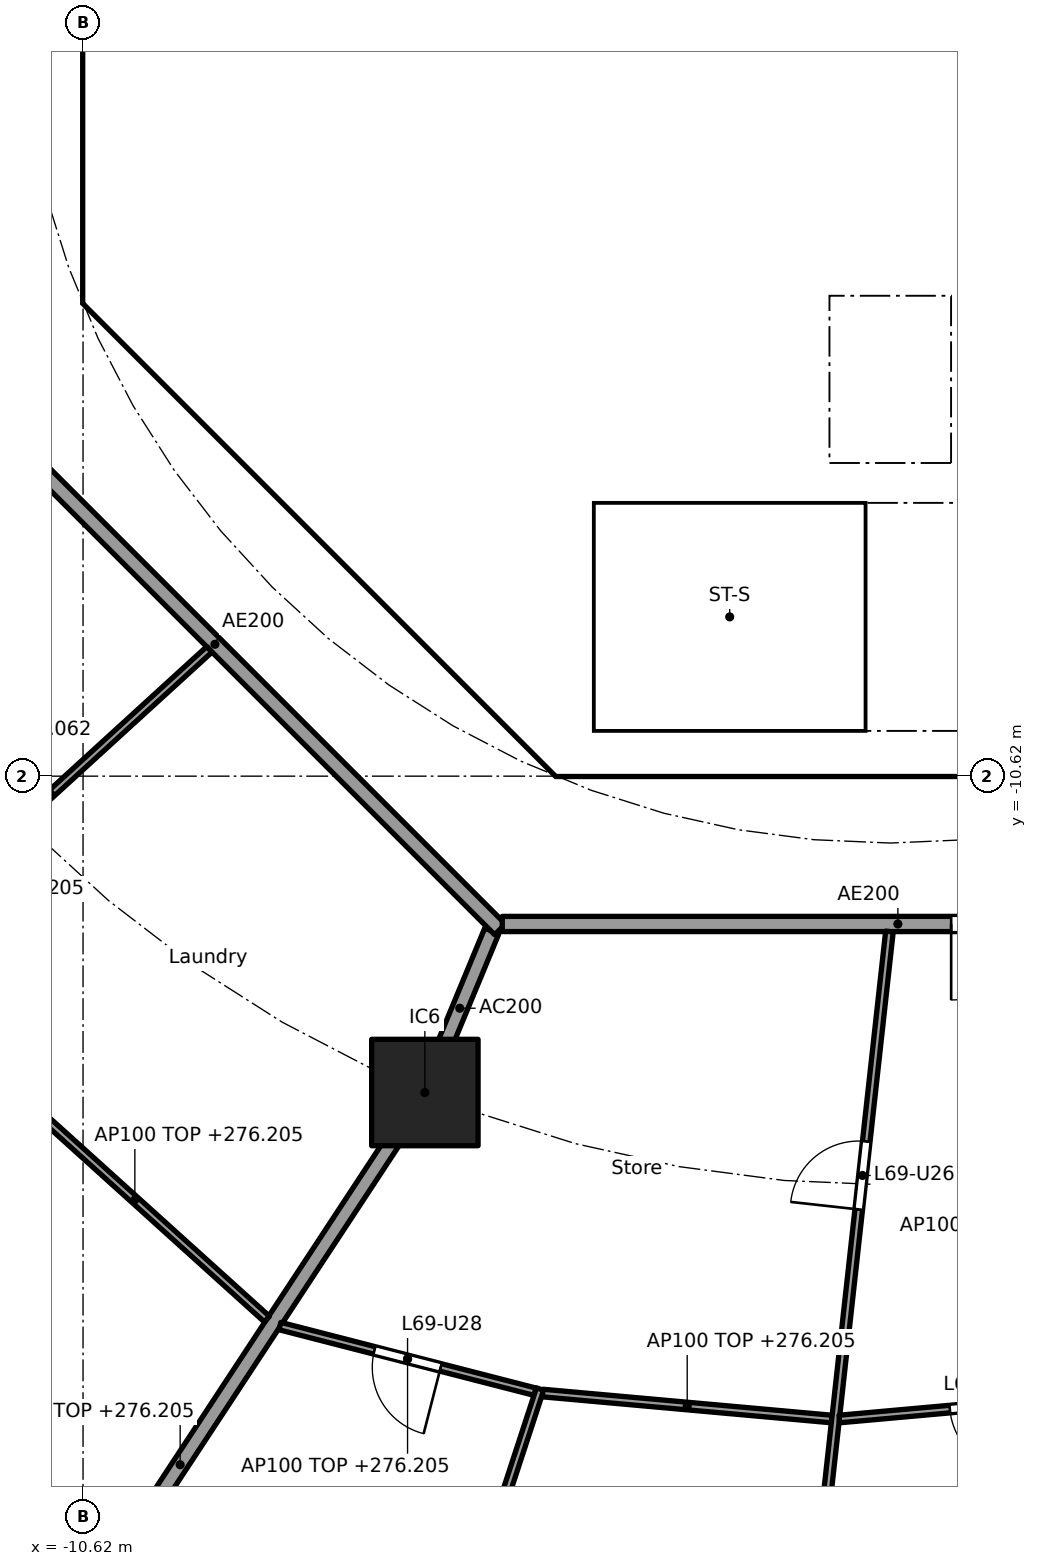
"""IFC4 building model, lengths in metres.
Left out: names, types, materials, properties, quantities, classifications, styles, units other than length and angle.
Written with IfcOpenShell. Run it as: python <this file> out.ifc"""

import sys

from ifc_helpers import new_model, si_unit, direction, frame, frame_2d, origin, origin_2d, place, context, subcontext, project, spatial, polyline, rectangle, outline, extrude, element, fill, save


model = new_model("IFC4")
c1 = context("Model", 3, precision=1e-05, world=origin(), true_north=direction((0.0, 1.0)))
c2 = subcontext(c1, "Body", "Model", "MODEL_VIEW")
j1 = project(units=[si_unit("LENGTHUNIT", "METRE"), si_unit("PLANEANGLEUNIT", "RADIAN")], contexts=[c1])
p1 = place(None, origin())
s1 = spatial("IfcSite", under=j1, at=p1, CompositionType="ELEMENT")
p2 = place(p1, origin())
s2 = spatial("IfcBuilding", under=s1, at=p2, CompositionType="ELEMENT")
p3 = place(p2, frame((0.0, 0.0, 273.3)))
s3 = spatial("IfcBuildingStorey", under=s2, at=p3, CompositionType="ELEMENT", Elevation=273.3)
p4 = place(p3, frame((-6.123, -14.782, 0.0), z_axis=(0.0, 0.0, 1.0), x_axis=(1.0, 0.0, 0.0)))
e1 = element("IfcColumn", 1, at=p4, inside=s3, PredefinedType="COLUMN", context=c2, shape_type="SweptSolid", body=[
    extrude(rectangle(XDim=1.4, YDim=1.4, at=origin_2d()), origin(), (0.0, 0.0, 1.0), 3.7),
])
p5 = place(p3, frame((-10.325, 3.801, 0.0), z_axis=(0.0, 0.0, 1.0), x_axis=(0.0, -1.0, 0.0)))
e2 = element("IfcWall", 2, at=p5, inside=s3, PredefinedType="SHEAR", context=c2, shape_type="SweptSolid", body=[
    extrude(rectangle(XDim=7.602, YDim=0.6, at=frame_2d((3.801, 0.0))), origin(), (0.0, 0.0, 1.0), 3.44),
])
p6 = place(p5, frame((0.651, 0.0, 0.0)))
e3 = element("IfcOpeningElement", 3, at=p6, cuts=e2, PredefinedType="OPENING", context=c2, shape_type="SweptSolid", body=[
    extrude(rectangle(XDim=1.5, YDim=2.1, at=frame_2d((0.75, 1.05))), frame((0.0, 0.31, 0.0), z_axis=(0.0, -1.0, 0.0), x_axis=(1.0, 0.0, 0.0)), (0.0, 0.0, 1.0), 0.62),
])
p7 = place(p5, frame((5.451, 0.0, 0.0)))
e4 = element("IfcOpeningElement", 4, at=p7, cuts=e2, PredefinedType="OPENING", context=c2, shape_type="SweptSolid", body=[
    extrude(rectangle(XDim=1.5, YDim=2.1, at=frame_2d((0.75, 1.05))), frame((0.0, 0.31, 0.0), z_axis=(0.0, -1.0, 0.0), x_axis=(1.0, 0.0, 0.0)), (0.0, 0.0, 1.0), 0.62),
])
p8 = place(p3, frame((-9.988, -4.613, 0.0), z_axis=(0.0, 0.0, 1.0), x_axis=(0.707106781187, -0.707106781187, 0.0)))
e5 = element("IfcWall", 5, at=p8, inside=s3, PredefinedType="SHEAR", context=c2, shape_type="SweptSolid", body=[
    extrude(rectangle(XDim=7.602, YDim=0.6, at=frame_2d((3.801, 0.0))), origin(), (0.0, 0.0, 1.0), 3.44),
])
p9 = place(p8, frame((6.151, 0.0, 0.0)))
e6 = element("IfcOpeningElement", 6, at=p9, cuts=e5, PredefinedType="OPENING", context=c2, shape_type="SweptSolid", body=[
    extrude(rectangle(XDim=1.1, YDim=2.1, at=frame_2d((0.55, 1.05))), frame((0.0, 0.31, 0.0), z_axis=(0.0, -1.0, 0.0), x_axis=(1.0, 0.0, 0.0)), (0.0, 0.0, 1.0), 0.62),
])
p10 = place(p3, frame((-5.8, -8.227, 0.0), z_axis=(0.0, 0.0, 1.0), x_axis=(0.0, 1.0, 0.0)))
e7 = element("IfcWall", 7, at=p10, inside=s3, PredefinedType="PARTITIONING", context=c2, shape_type="SweptSolid", body=[
    extrude(rectangle(XDim=3.927, YDim=0.15, at=frame_2d((1.963, 0.0))), origin(), (0.0, 0.0, 1.0), 3.44),
])
p11 = place(p10, frame((2.615, 0.0, 0.0)))
e8 = element("IfcOpeningElement", 8, at=p11, cuts=e7, PredefinedType="OPENING", context=c2, shape_type="SweptSolid", body=[
    extrude(rectangle(XDim=0.9, YDim=2.1, at=frame_2d((0.45, 1.05))), frame((0.0, 0.085, 0.0), z_axis=(0.0, -1.0, 0.0), x_axis=(1.0, 0.0, 0.0)), (0.0, 0.0, 1.0), 0.17),
])
p12 = place(p10, frame((0.539, 0.0, 0.0)))
e9 = element("IfcOpeningElement", 9, at=p12, cuts=e7, PredefinedType="OPENING", context=c2, shape_type="SweptSolid", body=[
    extrude(rectangle(XDim=0.9, YDim=2.1, at=frame_2d((0.45, 1.05))), frame((0.0, 0.085, 0.0), z_axis=(0.0, -1.0, 0.0), x_axis=(1.0, 0.0, 0.0)), (0.0, 0.0, 1.0), 0.17),
])
p13 = place(p3, frame((-4.0, -6.5, 0.0), z_axis=(0.0, 0.0, 1.0), x_axis=(0.0, 1.0, 0.0)))
e10 = element("IfcWall", 10, at=p13, inside=s3, PredefinedType="SOLIDWALL", context=c2, shape_type="SweptSolid", body=[
    extrude(rectangle(XDim=2.2, YDim=0.2, at=frame_2d((1.1, 0.0))), origin(), (0.0, 0.0, 1.0), 3.44),
])
p14 = place(p13, frame((0.65, 0.0, 0.0)))
e11 = element("IfcOpeningElement", 11, at=p14, cuts=e10, PredefinedType="OPENING", context=c2, shape_type="SweptSolid", body=[
    extrude(rectangle(XDim=0.9, YDim=2.1, at=frame_2d((0.45, 1.05))), frame((0.0, 0.11, 0.0), z_axis=(0.0, -1.0, 0.0), x_axis=(1.0, 0.0, 0.0)), (0.0, 0.0, 1.0), 0.22),
])
p15 = place(p3, frame((-6.7, -2.0, 0.0), z_axis=(0.0, 0.0, 1.0), x_axis=(1.0, 0.0, 0.0)))
e12 = element("IfcWall", 12, at=p15, inside=s3, PredefinedType="SOLIDWALL", context=c2, shape_type="SweptSolid", body=[
    extrude(rectangle(XDim=13.4, YDim=0.2, at=frame_2d((6.7, 0.0))), origin(), (0.0, 0.0, 1.0), 3.44),
])
p16 = place(p15, frame((9.45, 0.0, 0.0)))
e13 = element("IfcOpeningElement", 13, at=p16, cuts=e12, PredefinedType="OPENING", context=c2, shape_type="SweptSolid", body=[
    extrude(rectangle(XDim=1.1, YDim=2.1, at=frame_2d((0.55, 1.05))), frame((0.0, 0.11, 0.0), z_axis=(0.0, -1.0, 0.0), x_axis=(1.0, 0.0, 0.0)), (0.0, 0.0, 1.0), 0.22),
])
p17 = place(p15, frame((11.65, 0.0, 0.0)))
e14 = element("IfcOpeningElement", 14, at=p17, cuts=e12, PredefinedType="OPENING", context=c2, shape_type="SweptSolid", body=[
    extrude(rectangle(XDim=1.1, YDim=2.1, at=frame_2d((0.55, 1.05))), frame((0.0, 0.11, 0.0), z_axis=(0.0, -1.0, 0.0), x_axis=(1.0, 0.0, 0.0)), (0.0, 0.0, 1.0), 0.22),
])
p18 = place(p15, frame((1.85, 0.0, 0.0)))
e15 = element("IfcOpeningElement", 15, at=p18, cuts=e12, PredefinedType="OPENING", context=c2, shape_type="SweptSolid", body=[
    extrude(rectangle(XDim=0.9, YDim=2.1, at=frame_2d((0.45, 1.05))), frame((0.0, 0.11, 0.0), z_axis=(0.0, -1.0, 0.0), x_axis=(1.0, 0.0, 0.0)), (0.0, 0.0, 1.0), 0.22),
])
p19 = place(p15, frame((6.25, 0.0, 0.0)))
e16 = element("IfcOpeningElement", 16, at=p19, cuts=e12, PredefinedType="OPENING", context=c2, shape_type="SweptSolid", body=[
    extrude(rectangle(XDim=0.9, YDim=2.1, at=frame_2d((0.45, 1.05))), frame((0.0, 0.11, 0.0), z_axis=(0.0, -1.0, 0.0), x_axis=(1.0, 0.0, 0.0)), (0.0, 0.0, 1.0), 0.22),
])
p20 = place(p3, origin())
e17 = element("IfcWall", 17, at=p20, inside=s3, PredefinedType="SHEAR", context=c2, shape_type="SweptSolid", body=[
    extrude(outline(polyline([(-10.625, -3.801), (-10.025, -3.801), (-10.025, -4.152), (-9.776, -4.401), (-10.2, -4.825), (-10.625, -4.401), (-10.625, -3.801)])), origin(), (0.0, 0.0, 1.0), 3.44),
])
p21 = place(p3, origin())
e18 = element("IfcWall", 18, at=p21, inside=s3, PredefinedType="SHEAR", context=c2, shape_type="SweptSolid", body=[
    extrude(outline(polyline([(-4.152, -10.025), (4.152, -10.025), (4.401, -9.776), (4.825, -10.2), (4.401, -10.625), (-4.401, -10.625), (-4.825, -10.2), (-4.401, -9.776), (-4.152, -10.025)])), origin(), (0.0, 0.0, 1.0), 3.44),
])
p22 = place(p3, frame((-10.025, -4.0, 0.0), z_axis=(0.0, 0.0, 1.0), x_axis=(1.0, 0.0, 0.0)))
e19 = element("IfcWall", 19, at=p22, inside=s3, PredefinedType="PARTITIONING", context=c2, shape_type="SweptSolid", body=[
    extrude(rectangle(XDim=3.325, YDim=0.2, at=frame_2d((1.662, 0.0))), origin(), (0.0, 0.0, 1.0), 3.44),
])
p23 = place(p3, frame((-8.001, -6.1, 0.0), z_axis=(0.0, 0.0, 1.0), x_axis=(1.0, 0.0, 0.0)))
e20 = element("IfcWall", 20, at=p23, inside=s3, PredefinedType="PARTITIONING", context=c2, shape_type="SweptSolid", body=[
    extrude(rectangle(XDim=2.126, YDim=0.15, at=frame_2d((1.063, 0.0))), origin(), (0.0, 0.0, 1.0), 3.44),
])
for number, where, z_axis, x_axis in (
    (21, (-0.9, -6.5, 0.0), (0.0, 0.0, 1.0), (0.0, 1.0, 0.0)),
    (22, (0.9, -6.5, 0.0), (0.0, 0.0, 1.0), (0.0, 1.0, 0.0)),
):
    element("IfcWall", number, at=place(p3, frame(where, z_axis=z_axis, x_axis=x_axis)), inside=s3, PredefinedType="SOLIDWALL", context=c2, shape_type="SweptSolid", body=[
        extrude(rectangle(XDim=2.2, YDim=0.2, at=frame_2d((1.1, 0.0))), origin(), (0.0, 0.0, 1.0), 3.44),
    ])
p24 = place(p3, origin())
e23 = element("IfcWall", 23, at=p24, inside=s3, PredefinedType="SOLIDWALL", context=c2, shape_type="SweptSolid", body=[
    extrude(outline(polyline([(-6.7, -2.1), (-6.5, -2.1), (-6.5, -4.1), (-2.3, -4.1), (-2.3, -2.1), (-2.1, -2.1), (-2.1, -4.1), (2.1, -4.1), (2.1, -2.1), (2.3, -2.1), (2.3, -4.1), (4.3, -4.1), (4.3, -2.1), (4.5, -2.1), (4.5, -4.1), (6.5, -4.1), (6.5, -2.1), (6.7, -2.1), (6.7, -4.3), (-6.7, -4.3), (-6.7, -2.1)])), origin(), (0.0, 0.0, 1.0), 3.44),
])
p25 = place(p3, origin())
e24 = element("IfcWall", 24, at=p25, inside=s3, PredefinedType="SOLIDWALL", context=c2, shape_type="SweptSolid", body=[
    extrude(outline(polyline([(-3.9, -10.025), (-4.1, -10.025), (-4.1, -7.025), (-3.9, -7.025), (-3.9, -10.025)])), origin(), (0.0, 0.0, 1.0), 3.44),
])
p26 = place(p3, origin())
e25 = element("IfcWall", 25, at=p26, inside=s3, PredefinedType="SOLIDWALL", context=c2, shape_type="SweptSolid", body=[
    extrude(outline(polyline([(4.1, -7.025), (-4.1, -7.025), (-4.1, -6.5), (4.1, -6.5), (4.1, -7.025)])), origin(), (0.0, 0.0, 1.0), 3.44),
])
p27 = place(p3, frame((-5.243, -12.657, 0.0), z_axis=(0.0, 0.0, 1.0), x_axis=(-0.382770106157, -0.923843626288, 0.0)))
e26 = element("IfcWall", 26, at=p27, inside=s3, PredefinedType="PARTITIONING", context=c2, shape_type="SweptSolid", body=[
    extrude(rectangle(XDim=2.199, YDim=0.2, at=frame_2d((1.1, 0.0))), origin(), (0.0, 0.0, 1.0), 3.44),
])
p28 = place(p3, frame((-6.151, -14.824, 0.0), z_axis=(0.0, 0.0, 1.0), x_axis=(-0.549345577828, -0.835595258556, 0.0)))
e27 = element("IfcWall", 27, at=p28, inside=s3, PredefinedType="PARTITIONING", context=c2, shape_type="SweptSolid", body=[
    extrude(rectangle(XDim=11.62, YDim=0.2, at=frame_2d((5.81, 0.0))), origin(), (0.0, 0.0, 1.0), 2.905),
])
p29 = place(p3, frame((-12.635, -5.134, 0.0), z_axis=(0.0, 0.0, 1.0), x_axis=(0.707106781187, -0.707106781187, 0.0)))
e28 = element("IfcWall", 28, at=p29, inside=s3, PredefinedType="PARTITIONING", context=c2, shape_type="SweptSolid", body=[
    extrude(rectangle(XDim=10.609, YDim=0.2, at=frame_2d((5.305, 0.0))), origin(), (0.0, 0.0, 1.0), 3.44),
])
p30 = place(p3, frame((-5.104, -12.565, 0.0), z_axis=(0.0, 0.0, 1.0), x_axis=(1.0, 0.0, 0.0)))
e29 = element("IfcWall", 29, at=p30, inside=s3, PredefinedType="PARTITIONING", context=c2, shape_type="SweptSolid", body=[
    extrude(rectangle(XDim=10.409, YDim=0.2, at=frame_2d((5.205, 0.0))), origin(), (0.0, 0.0, 1.0), 3.44),
])
p31 = place(p30, frame((5.906, 0.0, 0.0)))
e30 = element("IfcOpeningElement", 30, at=p31, cuts=e29, PredefinedType="OPENING", context=c2, shape_type="SweptSolid", body=[
    extrude(rectangle(XDim=1.0, YDim=2.1, at=frame_2d((0.5, 1.05))), frame((0.0, 0.11, 0.0), z_axis=(0.0, -1.0, 0.0), x_axis=(1.0, 0.0, 0.0)), (0.0, 0.0, 1.0), 0.22),
])
p32 = place(p3, frame((-8.958, -8.952, 0.0), z_axis=(0.0, 0.0, 1.0), x_axis=(-0.73876526954, -0.673962815385, 0.0)))
e31 = element("IfcWall", 31, at=p32, inside=s3, PredefinedType="PARTITIONING", context=c2, shape_type="SweptSolid", body=[
    extrude(rectangle(XDim=5.647, YDim=0.1, at=frame_2d((2.824, 0.0))), origin(), (0.0, 0.0, 1.0), 2.762),
])
p33 = place(p3, frame((-11.676, -14.628, 0.0), z_axis=(0.0, 0.0, 1.0), x_axis=(0.74245829867, -0.669892285921, 0.0)))
e32 = element("IfcWall", 32, at=p33, inside=s3, PredefinedType="PARTITIONING", context=c2, shape_type="SweptSolid", body=[
    extrude(rectangle(XDim=4.68, YDim=0.1, at=frame_2d((2.34, 0.0))), origin(), (0.0, 0.0, 1.0), 2.905),
])
p34 = place(p3, frame((-8.03, -17.854, 0.0), z_axis=(0.0, 0.0, 1.0), x_axis=(0.968441967324, -0.249239154077, 0.0)))
e33 = element("IfcWall", 33, at=p34, inside=s3, PredefinedType="PARTITIONING", context=c2, shape_type="SweptSolid", body=[
    extrude(rectangle(XDim=3.468, YDim=0.1, at=frame_2d((1.734, 0.0))), origin(), (0.0, 0.0, 1.0), 2.905),
])
p35 = place(p34, frame((1.284, 0.0, 0.0)))
e34 = element("IfcOpeningElement", 34, at=p35, cuts=e33, PredefinedType="OPENING", context=c2, shape_type="SweptSolid", body=[
    extrude(rectangle(XDim=0.9, YDim=2.1, at=frame_2d((0.45, 1.05))), frame((0.0, 0.06, 0.0), z_axis=(0.0, -1.0, 0.0), x_axis=(1.0, 0.0, 0.0)), (0.0, 0.0, 1.0), 0.12),
])
p36 = place(p3, frame((-4.608, -18.684, 0.0), z_axis=(0.0, 0.0, 1.0), x_axis=(-0.311419102378, -0.95027266754, 0.0)))
e35 = element("IfcWall", 35, at=p36, inside=s3, PredefinedType="PARTITIONING", context=c2, shape_type="SweptSolid", body=[
    extrude(rectangle(XDim=8.735, YDim=0.1, at=frame_2d((4.367, 0.0))), origin(), (0.0, 0.0, 1.0), 2.905),
])
p37 = place(p36, frame((3.942, 0.0, 0.0)))
e36 = element("IfcOpeningElement", 36, at=p37, cuts=e35, PredefinedType="OPENING", context=c2, shape_type="SweptSolid", body=[
    extrude(rectangle(XDim=0.9, YDim=2.1, at=frame_2d((0.45, 1.05))), frame((0.0, 0.06, 0.0), z_axis=(0.0, -1.0, 0.0), x_axis=(1.0, 0.0, 0.0)), (0.0, 0.0, 1.0), 0.12),
])
p38 = place(p3, frame((-4.573, -18.736, 0.0), z_axis=(0.0, 0.0, 1.0), x_axis=(0.995986472869, -0.089503887414, 0.0)))
e37 = element("IfcWall", 37, at=p38, inside=s3, PredefinedType="PARTITIONING", context=c2, shape_type="SweptSolid", body=[
    extrude(rectangle(XDim=3.819, YDim=0.1, at=frame_2d((1.909, 0.0))), origin(), (0.0, 0.0, 1.0), 2.905),
])
p39 = place(p3, frame((-0.011, -12.664, 0.0), z_axis=(0.0, 0.0, 1.0), x_axis=(-0.109805889692, -0.993953050495, 0.0)))
e38 = element("IfcWall", 38, at=p39, inside=s3, PredefinedType="PARTITIONING", context=c2, shape_type="SweptSolid", body=[
    extrude(rectangle(XDim=15.248, YDim=0.1, at=frame_2d((7.624, 0.0))), origin(), (0.0, 0.0, 1.0), 2.762),
])
p40 = place(p39, frame((2.778, 0.0, 0.0)))
e39 = element("IfcOpeningElement", 39, at=p40, cuts=e38, PredefinedType="OPENING", context=c2, shape_type="SweptSolid", body=[
    extrude(rectangle(XDim=0.9, YDim=2.1, at=frame_2d((0.45, 1.05))), frame((0.0, 0.06, 0.0), z_axis=(0.0, -1.0, 0.0), x_axis=(1.0, 0.0, 0.0)), (0.0, 0.0, 1.0), 0.12),
])
p41 = place(p3, frame((-0.67, -19.077, 0.0), z_axis=(0.0, 0.0, 1.0), x_axis=(0.995986472869, 0.089503887414, 0.0)))
e40 = element("IfcWall", 40, at=p41, inside=s3, PredefinedType="PARTITIONING", context=c2, shape_type="SweptSolid", body=[
    extrude(rectangle(XDim=3.819, YDim=0.1, at=frame_2d((1.909, 0.0))), origin(), (0.0, 0.0, 1.0), 2.905),
])
p42 = place(p41, frame((1.459, 0.0, 0.0)))
e41 = element("IfcOpeningElement", 41, at=p42, cuts=e40, PredefinedType="OPENING", context=c2, shape_type="SweptSolid", body=[
    extrude(rectangle(XDim=0.9, YDim=2.1, at=frame_2d((0.45, 1.05))), frame((0.0, 0.06, 0.0), z_axis=(0.0, -1.0, 0.0), x_axis=(1.0, 0.0, 0.0)), (0.0, 0.0, 1.0), 0.12),
])
p43 = place(p11, origin())
e42 = element("IfcDoor", 42, at=p43, inside=s3, OperationType="SINGLE_SWING_RIGHT", PredefinedType="DOOR", context=c2, shape_type="SweptSolid", body=[
    extrude(rectangle(XDim=0.9, YDim=2.1, at=frame_2d((0.45, 1.05))), frame((0.0, 0.025, 0.0), z_axis=(0.0, -1.0, 0.0), x_axis=(1.0, 0.0, 0.0)), (0.0, 0.0, 1.0), 0.05),
])
fill(e8, e42)
p44 = place(p12, origin())
e43 = element("IfcDoor", 43, at=p44, inside=s3, OperationType="SINGLE_SWING_RIGHT", PredefinedType="DOOR", context=c2, shape_type="SweptSolid", body=[
    extrude(rectangle(XDim=0.9, YDim=2.1, at=frame_2d((0.45, 1.05))), frame((0.0, 0.025, 0.0), z_axis=(0.0, -1.0, 0.0), x_axis=(1.0, 0.0, 0.0)), (0.0, 0.0, 1.0), 0.05),
])
fill(e9, e43)
p45 = place(p14, frame((0.9, 0.0, 0.0), x_axis=(-1.0, 0.0, 0.0)))
e44 = element("IfcDoor", 44, at=p45, inside=s3, OperationType="SINGLE_SWING_RIGHT", PredefinedType="DOOR", context=c2, shape_type="SweptSolid", body=[
    extrude(rectangle(XDim=0.9, YDim=2.1, at=frame_2d((0.45, 1.05))), frame((0.0, 0.025, 0.0), z_axis=(0.0, -1.0, 0.0), x_axis=(1.0, 0.0, 0.0)), (0.0, 0.0, 1.0), 0.05),
])
fill(e11, e44)
p46 = place(p18, frame((0.9, 0.0, 0.0), x_axis=(-1.0, 0.0, 0.0)))
e45 = element("IfcDoor", 45, at=p46, inside=s3, OperationType="SINGLE_SWING_RIGHT", PredefinedType="DOOR", context=c2, shape_type="SweptSolid", body=[
    extrude(rectangle(XDim=0.9, YDim=2.1, at=frame_2d((0.45, 1.05))), frame((0.0, 0.025, 0.0), z_axis=(0.0, -1.0, 0.0), x_axis=(1.0, 0.0, 0.0)), (0.0, 0.0, 1.0), 0.05),
])
fill(e15, e45)
p47 = place(p19, frame((0.9, 0.0, 0.0), x_axis=(-1.0, 0.0, 0.0)))
e46 = element("IfcDoor", 46, at=p47, inside=s3, OperationType="SINGLE_SWING_RIGHT", PredefinedType="DOOR", context=c2, shape_type="SweptSolid", body=[
    extrude(rectangle(XDim=0.9, YDim=2.1, at=frame_2d((0.45, 1.05))), frame((0.0, 0.025, 0.0), z_axis=(0.0, -1.0, 0.0), x_axis=(1.0, 0.0, 0.0)), (0.0, 0.0, 1.0), 0.05),
])
fill(e16, e46)
p48 = place(p7, origin())
e47 = element("IfcDoor", 47, at=p48, inside=s3, OperationType="DOUBLE_DOOR_SINGLE_SWING", PredefinedType="DOOR", context=c2, shape_type="SweptSolid", body=[
    extrude(rectangle(XDim=1.5, YDim=2.1, at=frame_2d((0.75, 1.05))), frame((0.0, 0.025, 0.0), z_axis=(0.0, -1.0, 0.0), x_axis=(1.0, 0.0, 0.0)), (0.0, 0.0, 1.0), 0.05),
])
fill(e4, e47)
p49 = place(p9, origin())
e48 = element("IfcDoor", 48, at=p49, inside=s3, OperationType="SINGLE_SWING_RIGHT", PredefinedType="DOOR", context=c2, shape_type="SweptSolid", body=[
    extrude(rectangle(XDim=1.1, YDim=2.1, at=frame_2d((0.55, 1.05))), frame((0.0, 0.025, 0.0), z_axis=(0.0, -1.0, 0.0), x_axis=(1.0, 0.0, 0.0)), (0.0, 0.0, 1.0), 0.05),
])
fill(e6, e48)
p50 = place(p31, frame((1.0, 0.0, 0.0), x_axis=(-1.0, 0.0, 0.0)))
e49 = element("IfcDoor", 49, at=p50, inside=s3, OperationType="SINGLE_SWING_RIGHT", PredefinedType="DOOR", context=c2, shape_type="SweptSolid", body=[
    extrude(rectangle(XDim=1.0, YDim=2.1, at=frame_2d((0.5, 1.05))), frame((0.0, 0.025, 0.0), z_axis=(0.0, -1.0, 0.0), x_axis=(1.0, 0.0, 0.0)), (0.0, 0.0, 1.0), 0.05),
])
fill(e30, e49)
p51 = place(p40, frame((0.9, 0.0, 0.0), x_axis=(-1.0, 0.0, 0.0)))
e50 = element("IfcDoor", 50, at=p51, inside=s3, OperationType="SINGLE_SWING_LEFT", PredefinedType="DOOR", context=c2, shape_type="SweptSolid", body=[
    extrude(rectangle(XDim=0.9, YDim=2.1, at=frame_2d((0.45, 1.05))), frame((0.0, 0.025, 0.0), z_axis=(0.0, -1.0, 0.0), x_axis=(1.0, 0.0, 0.0)), (0.0, 0.0, 1.0), 0.05),
])
fill(e39, e50)
p52 = place(p35, frame((0.9, 0.0, 0.0), x_axis=(-1.0, 0.0, 0.0)))
e51 = element("IfcDoor", 51, at=p52, inside=s3, OperationType="SINGLE_SWING_LEFT", PredefinedType="DOOR", context=c2, shape_type="SweptSolid", body=[
    extrude(rectangle(XDim=0.9, YDim=2.1, at=frame_2d((0.45, 1.05))), frame((0.0, 0.025, 0.0), z_axis=(0.0, -1.0, 0.0), x_axis=(1.0, 0.0, 0.0)), (0.0, 0.0, 1.0), 0.05),
])
fill(e34, e51)
p53 = place(p42, frame((0.9, 0.0, 0.0), x_axis=(-1.0, 0.0, 0.0)))
e52 = element("IfcDoor", 52, at=p53, inside=s3, OperationType="SINGLE_SWING_LEFT", PredefinedType="DOOR", context=c2, shape_type="SweptSolid", body=[
    extrude(rectangle(XDim=0.9, YDim=2.1, at=frame_2d((0.45, 1.05))), frame((0.0, 0.025, 0.0), z_axis=(0.0, -1.0, 0.0), x_axis=(1.0, 0.0, 0.0)), (0.0, 0.0, 1.0), 0.05),
])
fill(e41, e52)
save(model, sys.argv[1])
